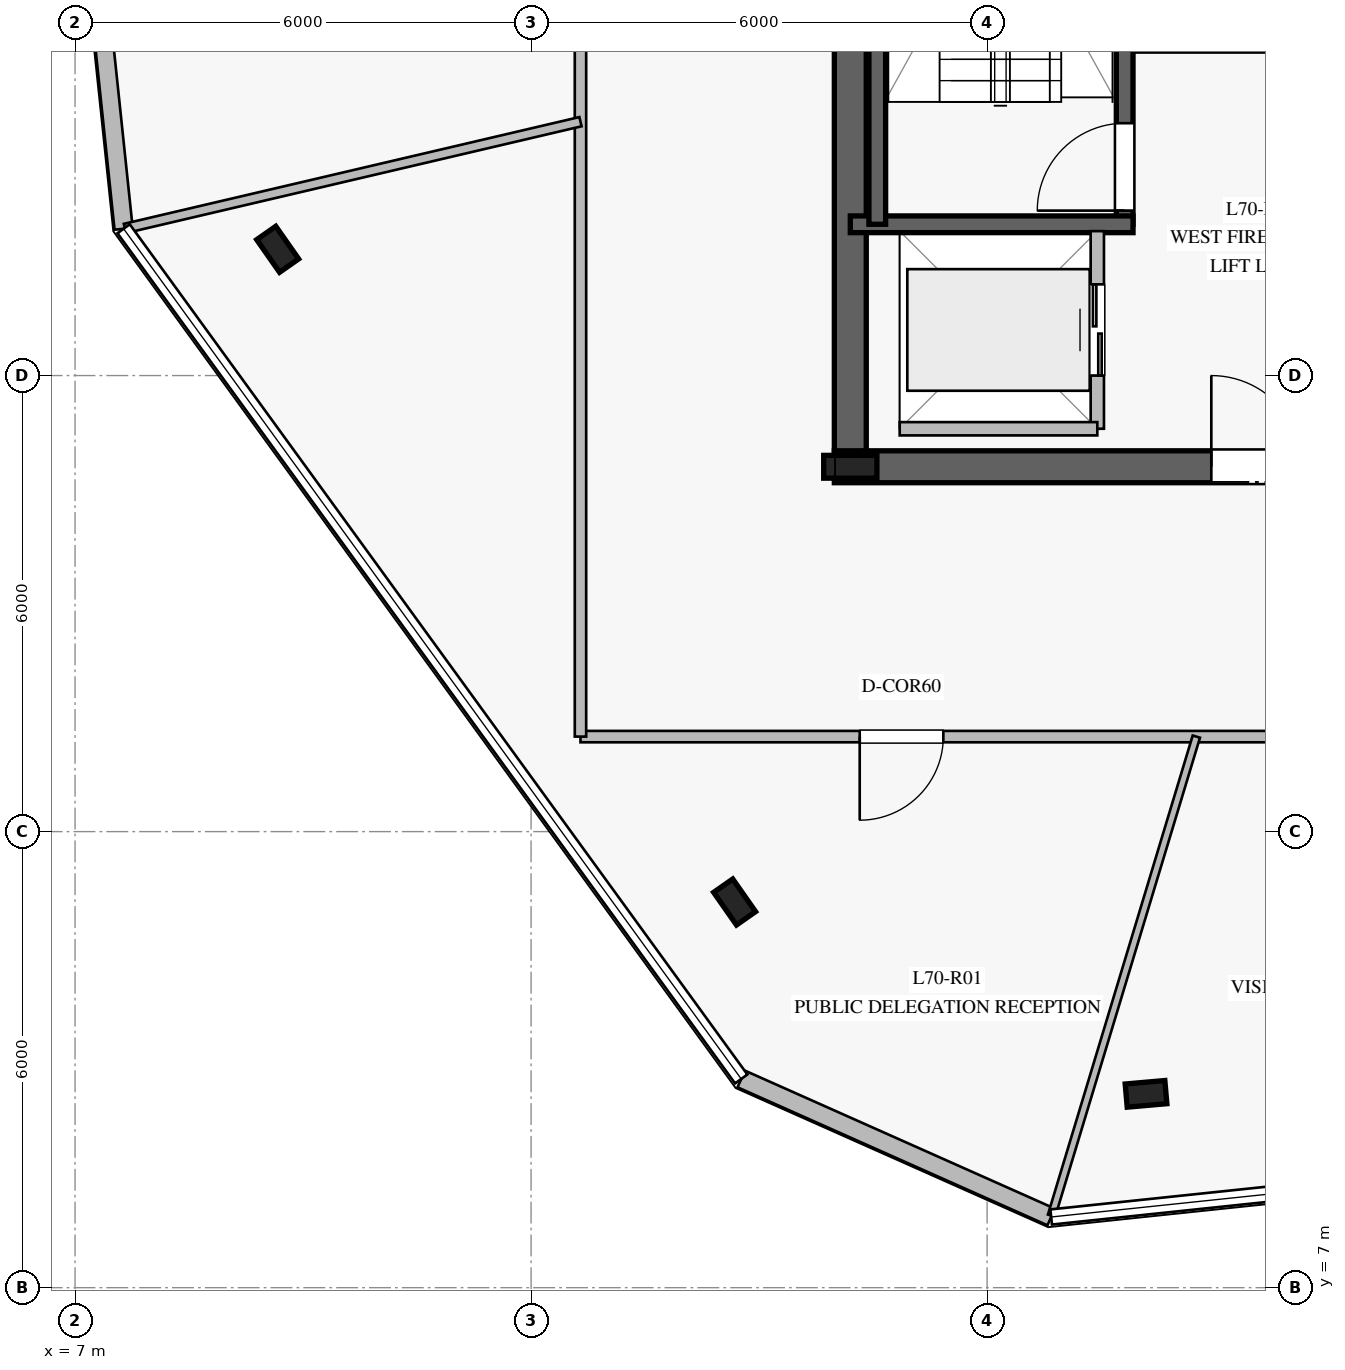
"""IFC4 building model, lengths in metres.
Left out: names, types, materials, properties, quantities, classifications, styles, units other than length and angle.
Written with IfcOpenShell. Run it as: python <this file> out.ifc"""

import sys

from ifc_helpers import new_model, si_unit, direction, frame, frame_2d, origin, origin_2d, place, context, subcontext, project, spatial, rectangle, i_section, extrude, element, fill, save


model = new_model("IFC4")
c1 = context("Model", 3, precision=1e-05, world=origin(), true_north=direction((0.0, 1.0)))
c2 = subcontext(c1, "Body", "Model", "MODEL_VIEW")
j1 = project(units=[si_unit("LENGTHUNIT", "METRE"), si_unit("PLANEANGLEUNIT", "RADIAN")], contexts=[c1])
p1 = place(None, origin())
s1 = spatial("IfcSite", under=j1, at=p1, CompositionType="ELEMENT")
p2 = place(p1, origin())
s2 = spatial("IfcBuilding", under=s1, at=p2, CompositionType="ELEMENT")
p3 = place(p2, frame((0.0, 0.0, 290.2)))
s3 = spatial("IfcBuildingStorey", under=s2, at=p3, CompositionType="ELEMENT", Elevation=290.2)
p4 = place(p3, frame((16.99, 17.8, 0.0), z_axis=(0.0, 0.0, 1.0), x_axis=(1.0, 0.0, 0.0)))
e1 = element("IfcWall", 1, at=p4, inside=s3, PredefinedType="SHEAR", context=c2, shape_type="SweptSolid", body=[
    extrude(rectangle(XDim=16.02, YDim=0.42, at=frame_2d((8.01, 0.0))), origin(), (0.0, 0.0, 1.0), 3.78),
])
p5 = place(p4, frame((4.96, 0.0, 0.0)))
e2 = element("IfcOpeningElement", 2, at=p5, cuts=e1, PredefinedType="OPENING", context=c2, shape_type="SweptSolid", body=[
    extrude(rectangle(XDim=1.2, YDim=2.25, at=frame_2d((0.6, 1.125))), frame((0.0, 0.22, 0.0), z_axis=(0.0, -1.0, 0.0), x_axis=(1.0, 0.0, 0.0)), (0.0, 0.0, 1.0), 0.44),
])
p6 = place(p4, frame((13.91, 0.0, 0.0)))
e3 = element("IfcOpeningElement", 3, at=p6, cuts=e1, PredefinedType="OPENING", context=c2, shape_type="SweptSolid", body=[
    extrude(rectangle(XDim=0.9, YDim=2.1, at=frame_2d((0.45, 1.05))), frame((0.0, 0.22, 0.0), z_axis=(0.0, -1.0, 0.0), x_axis=(1.0, 0.0, 0.0)), (0.0, 0.0, 1.0), 0.44),
])
p7 = place(p4, frame((9.16, 0.0, 0.0)))
e4 = element("IfcOpeningElement", 4, at=p7, cuts=e1, PredefinedType="OPENING", context=c2, shape_type="SweptSolid", body=[
    extrude(rectangle(XDim=1.1, YDim=2.2, at=frame_2d((0.55, 1.1))), frame((0.0, 0.22, 0.0), z_axis=(0.0, -1.0, 0.0), x_axis=(1.0, 0.0, 0.0)), (0.0, 0.0, 1.0), 0.44),
])
p8 = place(p3, frame((17.2, 31.99, 0.0), z_axis=(0.0, 0.0, 1.0), x_axis=(0.0, -1.0, 0.0)))
e5 = element("IfcWall", 5, at=p8, inside=s3, PredefinedType="SHEAR", context=c2, shape_type="SweptSolid", body=[
    extrude(rectangle(XDim=13.98, YDim=0.42, at=frame_2d((6.99, 0.0))), origin(), (0.0, 0.0, 1.0), 3.78),
])
p9 = place(p8, frame((2.14, 0.0, 0.0)))
e6 = element("IfcOpeningElement", 6, at=p9, cuts=e5, PredefinedType="OPENING", context=c2, shape_type="SweptSolid", body=[
    extrude(rectangle(XDim=1.5, YDim=2.2, at=frame_2d((0.75, 1.1))), frame((0.0, 0.22, 0.0), z_axis=(0.0, -1.0, 0.0), x_axis=(1.0, 0.0, 0.0)), (0.0, 0.0, 1.0), 0.44),
])
p10 = place(p3, frame((17.2, 17.8, 0.0), z_axis=(0.0, 0.0, 1.0), x_axis=(1.0, 0.0, 0.0)))
e7 = element("IfcColumn", 7, at=p10, inside=s3, PredefinedType="COLUMN", context=c2, shape_type="SweptSolid", body=[
    extrude(i_section(OverallWidth=0.3, OverallDepth=0.7, WebThickness=0.017, FlangeThickness=0.032, at=origin_2d()), origin(), (0.0, 0.0, 1.0), 4.0),
])
p11 = place(p3, frame((20.81, 20.99, 0.0), z_axis=(0.0, 0.0, 1.0), x_axis=(0.0, 1.0, 0.0)))
e8 = element("IfcWall", 8, at=p11, inside=s3, PredefinedType="SOLIDWALL", context=c2, shape_type="SweptSolid", body=[
    extrude(rectangle(XDim=7.22, YDim=0.22, at=frame_2d((3.61, 0.0))), origin(), (0.0, 0.0, 1.0), 3.78),
])
p12 = place(p11, frame((0.18, 0.0, 0.0)))
e9 = element("IfcOpeningElement", 9, at=p12, cuts=e8, PredefinedType="OPENING", context=c2, shape_type="SweptSolid", body=[
    extrude(rectangle(XDim=1.15, YDim=2.2, at=frame_2d((0.575, 1.1))), frame((0.0, 0.12, 0.0), z_axis=(0.0, -1.0, 0.0), x_axis=(1.0, 0.0, 0.0)), (0.0, 0.0, 1.0), 0.24),
])
p13 = place(p3, frame((17.2, 20.99, 0.0), z_axis=(0.0, 0.0, 1.0), x_axis=(1.0, 0.0, 0.0)))
e10 = element("IfcWall", 10, at=p13, inside=s3, PredefinedType="SOLIDWALL", context=c2, shape_type="SweptSolid", body=[
    extrude(rectangle(XDim=3.72, YDim=0.22, at=frame_2d((1.86, 0.0))), origin(), (0.0, 0.0, 1.0), 3.78),
])
p14 = place(p3, frame((17.555, 28.21, 0.0), z_axis=(0.0, 0.0, 1.0), x_axis=(0.0, -1.0, 0.0)))
e11 = element("IfcWall", 11, at=p14, inside=s3, PredefinedType="SOLIDWALL", context=c2, shape_type="SweptSolid", body=[
    extrude(rectangle(XDim=7.22, YDim=0.22, at=frame_2d((3.61, 0.0))), origin(), (0.0, 0.0, 1.0), 3.78),
])
for number, where, z_axis, x_axis in (
    (12, (9.666, 20.661, 0.0), (0.0, 0.0, 1.0), (-0.574, 0.819, 0.0)),
    (13, (15.678, 12.074, 0.0), (0.0, 0.0, 1.0), (-0.574, 0.819, 0.0)),
    (14, (21.091, 9.55, 0.0), (0.0, 0.0, 1.0), (0.996, 0.087, 0.0)),
):
    element("IfcColumn", number, at=place(p3, frame(where, z_axis=z_axis, x_axis=x_axis)), inside=s3, PredefinedType="COLUMN", context=c2, shape_type="SweptSolid", body=[
        extrude(i_section(OverallWidth=0.306, OverallDepth=0.524, WebThickness=0.021, FlangeThickness=0.04, at=origin_2d()), origin(), (0.0, 0.0, 1.0), 4.0),
    ])
p15 = place(p3, frame((7.172, 25.371, 0.0), z_axis=(0.0, 0.0, 1.0), x_axis=(0.104553844109, -0.994519227407, 0.0)))
e15 = element("IfcWall", 15, at=p15, inside=s3, PredefinedType="STANDARD", context=c2, shape_type="SweptSolid", body=[
    extrude(rectangle(XDim=4.465, YDim=0.24, at=frame_2d((2.232, 0.0))), origin(), (0.0, 0.0, 1.0), 3.78),
])
p16 = place(p3, frame((15.765, 9.746, 0.0), z_axis=(0.0, 0.0, 1.0), x_axis=(0.913506843716, -0.406823360297, 0.0)))
e16 = element("IfcWall", 16, at=p16, inside=s3, PredefinedType="STANDARD", context=c2, shape_type="SweptSolid", body=[
    extrude(rectangle(XDim=4.464, YDim=0.24, at=frame_2d((2.232, 0.0))), origin(), (0.0, 0.0, 1.0), 3.78),
])
p17 = place(p3, frame((20.92, 23.35, 0.0), z_axis=(0.0, 0.0, 1.0), x_axis=(1.0, 0.0, 0.0)))
e17 = element("IfcWall", 17, at=p17, inside=s3, PredefinedType="PARTITIONING", context=c2, shape_type="SweptSolid", body=[
    extrude(rectangle(XDim=3.38, YDim=0.2, at=frame_2d((1.69, 0.0))), origin(), (0.0, 0.0, 1.0), 3.78),
])
p18 = place(p3, frame((20.45, 18.3, 0.0), z_axis=(0.0, 0.0, 1.0), x_axis=(0.0, 1.0, 0.0)))
e18 = element("IfcWall", 18, at=p18, inside=s3, PredefinedType="PARTITIONING", context=c2, shape_type="SweptSolid", body=[
    extrude(rectangle(XDim=2.6, YDim=0.175, at=frame_2d((1.3, 0.0))), origin(), (0.0, 0.0, 1.0), 3.78),
])
p19 = place(p18, frame((0.7, 0.0, 0.0)))
e19 = element("IfcOpeningElement", 19, at=p19, cuts=e18, PredefinedType="OPENING", context=c2, shape_type="SweptSolid", body=[
    extrude(rectangle(XDim=1.2, YDim=2.2, at=frame_2d((0.6, 1.1))), frame((0.0, 0.098, 0.0), z_axis=(0.0, -1.0, 0.0), x_axis=(1.0, 0.0, 0.0)), (0.0, 0.0, 1.0), 0.195),
])
p20 = place(p3, frame((17.85, 18.3, 0.0), z_axis=(0.0, 0.0, 1.0), x_axis=(1.0, 0.0, 0.0)))
e20 = element("IfcWall", 20, at=p20, inside=s3, PredefinedType="PARTITIONING", context=c2, shape_type="SweptSolid", body=[
    extrude(rectangle(XDim=2.6, YDim=0.175, at=frame_2d((1.3, 0.0))), origin(), (0.0, 0.0, 1.0), 3.78),
])
p21 = place(p3, frame((36.35, 14.25, 0.0), z_axis=(0.0, 0.0, 1.0), x_axis=(-1.0, 0.0, 0.0)))
e21 = element("IfcWall", 21, at=p21, inside=s3, PredefinedType="PARTITIONING", context=c2, shape_type="SweptSolid", body=[
    extrude(rectangle(XDim=22.7, YDim=0.15, at=frame_2d((11.35, 0.0))), origin(), (0.0, 0.0, 1.0), 3.28),
])
p22 = place(p21, frame((17.926, 0.0, 0.0)))
e22 = element("IfcOpeningElement", 22, at=p22, cuts=e21, PredefinedType="OPENING", context=c2, shape_type="SweptSolid", body=[
    extrude(rectangle(XDim=1.1, YDim=2.2, at=frame_2d((0.55, 1.1))), frame((0.0, 0.085, 0.0), z_axis=(0.0, -1.0, 0.0), x_axis=(1.0, 0.0, 0.0)), (0.0, 0.0, 1.0), 0.17),
])
p23 = place(p21, frame((9.458, 0.0, 0.0)))
e23 = element("IfcOpeningElement", 23, at=p23, cuts=e21, PredefinedType="OPENING", context=c2, shape_type="SweptSolid", body=[
    extrude(rectangle(XDim=1.1, YDim=2.2, at=frame_2d((0.55, 1.1))), frame((0.0, 0.085, 0.0), z_axis=(0.0, -1.0, 0.0), x_axis=(1.0, 0.0, 0.0)), (0.0, 0.0, 1.0), 0.17),
])
p24 = place(p3, frame((13.65, 14.25, 0.0), z_axis=(0.0, 0.0, 1.0), x_axis=(0.0, 1.0, 0.0)))
e24 = element("IfcWall", 24, at=p24, inside=s3, PredefinedType="PARTITIONING", context=c2, shape_type="SweptSolid", body=[
    extrude(rectangle(XDim=21.5, YDim=0.15, at=frame_2d((10.75, 0.0))), origin(), (0.0, 0.0, 1.0), 3.05),
])
p25 = place(p24, frame((12.906, 0.0, 0.0)))
e25 = element("IfcOpeningElement", 25, at=p25, cuts=e24, PredefinedType="OPENING", context=c2, shape_type="SweptSolid", body=[
    extrude(rectangle(XDim=1.1, YDim=2.2, at=frame_2d((0.55, 1.1))), frame((0.0, 0.085, 0.0), z_axis=(0.0, -1.0, 0.0), x_axis=(1.0, 0.0, 0.0)), (0.0, 0.0, 1.0), 0.17),
])
p26 = place(p3, frame((13.65, 22.34, 0.0), z_axis=(0.0, 0.0, 1.0), x_axis=(-0.973608738479, -0.228223627956, 0.0)))
e26 = element("IfcWall", 26, at=p26, inside=s3, PredefinedType="PARTITIONING", context=c2, shape_type="SweptSolid", body=[
    extrude(rectangle(XDim=6.156, YDim=0.125, at=frame_2d((3.078, 0.0))), origin(), (0.0, 0.0, 1.0), 3.28),
])
p27 = place(p3, frame((21.753, 14.25, 0.0), z_axis=(0.0, 0.0, 1.0), x_axis=(-0.289316815041, -0.957233399195, 0.0)))
e27 = element("IfcWall", 27, at=p27, inside=s3, PredefinedType="MOVABLE", context=c2, shape_type="SweptSolid", body=[
    extrude(rectangle(XDim=6.584, YDim=0.1, at=frame_2d((3.292, 0.0))), origin(), (0.0, 0.0, 1.0), 3.28),
])
p28 = place(p12, origin())
e28 = element("IfcDoor", 28, at=p28, inside=s3, OperationType="SINGLE_SWING_LEFT", PredefinedType="DOOR", context=c2, shape_type="SweptSolid", body=[
    extrude(rectangle(XDim=1.15, YDim=2.2, at=frame_2d((0.575, 1.1))), frame((0.0, 0.025, 0.0), z_axis=(0.0, -1.0, 0.0), x_axis=(1.0, 0.0, 0.0)), (0.0, 0.0, 1.0), 0.05),
])
fill(e9, e28)
p29 = place(p5, origin())
e29 = element("IfcDoor", 29, at=p29, inside=s3, OperationType="SINGLE_SWING_LEFT", PredefinedType="DOOR", context=c2, shape_type="SweptSolid", body=[
    extrude(rectangle(XDim=1.2, YDim=2.25, at=frame_2d((0.6, 1.125))), frame((0.0, 0.025, 0.0), z_axis=(0.0, -1.0, 0.0), x_axis=(1.0, 0.0, 0.0)), (0.0, 0.0, 1.0), 0.05),
])
fill(e2, e29)
p30 = place(p19, origin())
e30 = element("IfcDoor", 30, at=p30, inside=s3, OperationType="DOUBLE_DOOR_SLIDING", PredefinedType="DOOR", context=c2, shape_type="SweptSolid", body=[
    extrude(rectangle(XDim=1.2, YDim=2.2, at=frame_2d((0.6, 1.1))), frame((0.0, 0.025, 0.0), z_axis=(0.0, -1.0, 0.0), x_axis=(1.0, 0.0, 0.0)), (0.0, 0.0, 1.0), 0.05),
])
fill(e19, e30)
p31 = place(p22, origin())
e31 = element("IfcDoor", 31, at=p31, inside=s3, OperationType="SINGLE_SWING_RIGHT", PredefinedType="DOOR", context=c2, shape_type="SweptSolid", body=[
    extrude(rectangle(XDim=1.1, YDim=2.2, at=frame_2d((0.55, 1.1))), frame((0.0, 0.025, 0.0), z_axis=(0.0, -1.0, 0.0), x_axis=(1.0, 0.0, 0.0)), (0.0, 0.0, 1.0), 0.05),
])
fill(e22, e31)
save(model, sys.argv[1])
